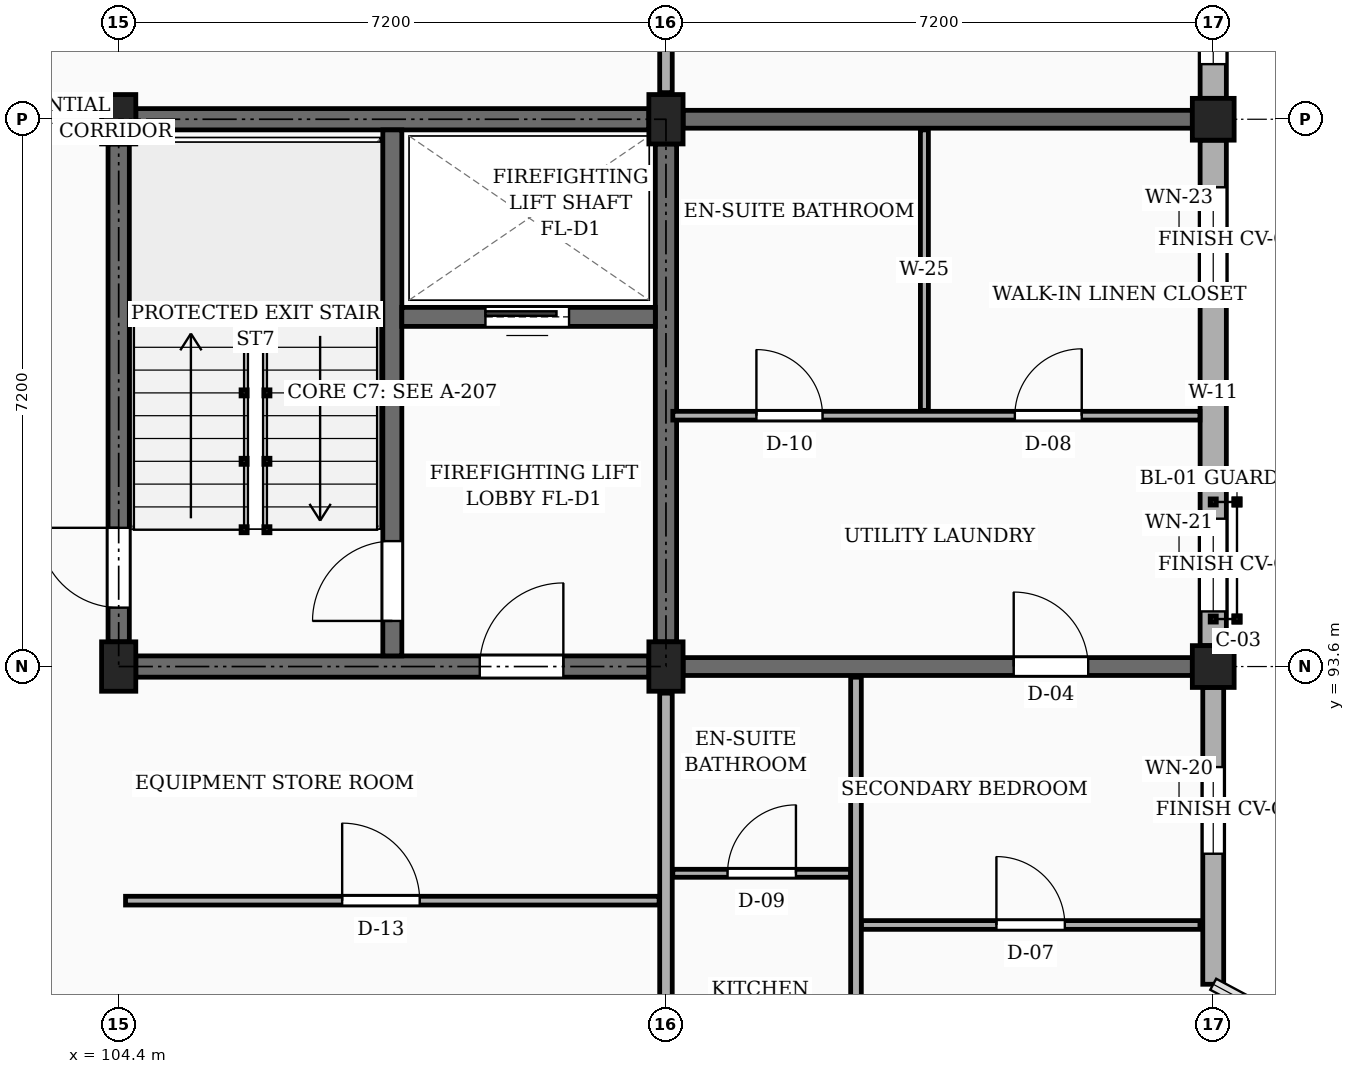
"""IFC4 building model, lengths in metres.
Left out: names, types, materials, properties, quantities, classifications, styles, units other than length and angle.
Written with IfcOpenShell. Run it as: python <this file> out.ifc"""

import sys

from ifc_helpers import new_model, si_unit, direction, frame, frame_2d, origin, origin_2d, place, context, subcontext, project, spatial, rectangle, extrude, element, fill, save


model = new_model("IFC4")
c1 = context("Model", 3, precision=1e-05, world=origin(), true_north=direction((0.0, 1.0)))
c2 = subcontext(c1, "Body", "Model", "MODEL_VIEW")
j1 = project(units=[si_unit("LENGTHUNIT", "METRE"), si_unit("PLANEANGLEUNIT", "RADIAN")], contexts=[c1])
p1 = place(None, origin())
s1 = spatial("IfcSite", under=j1, at=p1, CompositionType="ELEMENT")
p2 = place(p1, origin())
s2 = spatial("IfcBuilding", under=s1, at=p2, CompositionType="ELEMENT")
p3 = place(p2, frame((0.0, 0.0, 13.95)))
s3 = spatial("IfcBuildingStorey", under=s2, at=p3, CompositionType="ELEMENT", Elevation=13.95)
for number, where, z_axis, x_axis in (
    (1, (104.4, 93.6, 0.0), (0.0, 0.0, 1.0), (1.0, 0.0, 0.0)),
    (2, (104.4, 100.8, 0.0), (0.0, 0.0, 1.0), (1.0, 0.0, 0.0)),
    (3, (111.6, 93.6, 0.0), (0.0, 0.0, 1.0), (1.0, 0.0, 0.0)),
    (4, (111.6, 100.8, 0.0), (0.0, 0.0, 1.0), (1.0, 0.0, 0.0)),
):
    element("IfcColumn", number, at=place(p3, frame(where, z_axis=z_axis, x_axis=x_axis)), inside=s3, PredefinedType="COLUMN", context=c2, shape_type="SweptSolid", body=[
        extrude(rectangle(XDim=0.45, YDim=0.65, at=origin_2d()), origin(), (0.0, 0.0, 1.0), 3.15),
    ])
for number, where, z_axis, x_axis in (
    (5, (118.8, 93.6, 0.0), (0.0, 0.0, 1.0), (1.0, 0.0, 0.0)),
    (6, (118.8, 100.8, 0.0), (0.0, 0.0, 1.0), (1.0, 0.0, 0.0)),
):
    element("IfcColumn", number, at=place(p3, frame(where, z_axis=z_axis, x_axis=x_axis)), inside=s3, PredefinedType="COLUMN", context=c2, shape_type="SweptSolid", body=[
        extrude(rectangle(XDim=0.55, YDim=0.55, at=origin_2d()), origin(), (0.0, 0.0, 1.0), 3.15),
    ])
p4 = place(p3, frame((111.825, 93.6, 0.0), z_axis=(0.0, 0.0, 1.0), x_axis=(1.0, 0.0, 0.0)))
e7 = element("IfcWall", 7, at=p4, inside=s3, PredefinedType="SOLIDWALL", context=c2, shape_type="SweptSolid", body=[
    extrude(rectangle(XDim=6.7, YDim=0.235, at=frame_2d((3.35, 0.0))), origin(), (0.0, 0.0, 1.0), 2.19),
])
p5 = place(p4, frame((4.35, 0.0, 0.0)))
e8 = element("IfcOpeningElement", 8, at=p5, cuts=e7, PredefinedType="OPENING", context=c2, shape_type="SweptSolid", body=[
    extrude(rectangle(XDim=0.98, YDim=2.12, at=frame_2d((0.49, 1.06))), frame((0.0, 0.127, 0.0), z_axis=(0.0, -1.0, 0.0), x_axis=(1.0, 0.0, 0.0)), (0.0, 0.0, 1.0), 0.255),
])
p6 = place(p3, frame((111.825, 100.8, 0.0), z_axis=(0.0, 0.0, 1.0), x_axis=(1.0, 0.0, 0.0)))
e9 = element("IfcWall", 9, at=p6, inside=s3, PredefinedType="SOLIDWALL", context=c2, shape_type="SweptSolid", body=[
    extrude(rectangle(XDim=6.7, YDim=0.235, at=frame_2d((3.35, 0.0))), origin(), (0.0, 0.0, 1.0), 2.19),
])
p7 = place(p3, frame((118.8, 89.42, 0.0), z_axis=(0.0, 0.0, 1.0), x_axis=(0.0, 1.0, 0.0)))
e10 = element("IfcWall", 10, at=p7, inside=s3, PredefinedType="SOLIDWALL", context=c2, shape_type="SweptSolid", body=[
    extrude(rectangle(XDim=3.905, YDim=0.275, at=frame_2d((1.953, 0.0))), origin(), (0.0, 0.0, 1.0), 2.46),
])
p8 = place(p7, frame((1.718, 0.0, 0.78)))
e11 = element("IfcOpeningElement", 11, at=p8, cuts=e10, PredefinedType="OPENING", context=c2, shape_type="SweptSolid", body=[
    extrude(rectangle(XDim=1.14, YDim=1.36, at=frame_2d((0.57, 0.68))), frame((0.0, 0.147, 0.0), z_axis=(0.0, -1.0, 0.0), x_axis=(1.0, 0.0, 0.0)), (0.0, 0.0, 1.0), 0.295),
])
p9 = place(p3, frame((118.8, 93.875, 0.0), z_axis=(0.0, 0.0, 1.0), x_axis=(0.0, 1.0, 0.0)))
e12 = element("IfcWall", 12, at=p9, inside=s3, PredefinedType="SOLIDWALL", context=c2, shape_type="SweptSolid", body=[
    extrude(rectangle(XDim=6.65, YDim=0.345, at=frame_2d((3.325, 0.0))), origin(), (0.0, 0.0, 1.0), 2.46),
])
p10 = place(p9, frame((0.45, 0.0, 0.78)))
e13 = element("IfcOpeningElement", 13, at=p10, cuts=e12, PredefinedType="OPENING", context=c2, shape_type="SweptSolid", body=[
    extrude(rectangle(XDim=1.22, YDim=1.36, at=frame_2d((0.61, 0.68))), frame((0.0, 0.183, 0.0), z_axis=(0.0, -1.0, 0.0), x_axis=(1.0, 0.0, 0.0)), (0.0, 0.0, 1.0), 0.365),
])
p11 = place(p9, frame((4.65, 0.0, 0.78)))
e14 = element("IfcOpeningElement", 14, at=p11, cuts=e12, PredefinedType="OPENING", context=c2, shape_type="SweptSolid", body=[
    extrude(rectangle(XDim=1.38, YDim=1.36, at=frame_2d((0.69, 0.68))), frame((0.0, 0.183, 0.0), z_axis=(0.0, -1.0, 0.0), x_axis=(1.0, 0.0, 0.0)), (0.0, 0.0, 1.0), 0.365),
])
p12 = place(p3, frame((118.8, 101.075, 0.0), z_axis=(0.0, 0.0, 1.0), x_axis=(0.0, 1.0, 0.0)))
e15 = element("IfcWall", 15, at=p12, inside=s3, PredefinedType="SOLIDWALL", context=c2, shape_type="SweptSolid", body=[
    extrude(rectangle(XDim=6.65, YDim=0.345, at=frame_2d((3.325, 0.0))), origin(), (0.0, 0.0, 1.0), 2.46),
])
p13 = place(p12, frame((0.45, 0.0, 0.78)))
e16 = element("IfcOpeningElement", 16, at=p13, cuts=e15, PredefinedType="OPENING", context=c2, shape_type="SweptSolid", body=[
    extrude(rectangle(XDim=1.38, YDim=1.36, at=frame_2d((0.69, 0.68))), frame((0.0, 0.183, 0.0), z_axis=(0.0, -1.0, 0.0), x_axis=(1.0, 0.0, 0.0)), (0.0, 0.0, 1.0), 0.365),
])
p14 = place(p12, frame((4.65, 0.0, 0.78)))
e17 = element("IfcOpeningElement", 17, at=p14, cuts=e15, PredefinedType="OPENING", context=c2, shape_type="SweptSolid", body=[
    extrude(rectangle(XDim=0.94, YDim=1.44, at=frame_2d((0.47, 0.72))), frame((0.0, 0.183, 0.0), z_axis=(0.0, -1.0, 0.0), x_axis=(1.0, 0.0, 0.0)), (0.0, 0.0, 1.0), 0.365),
])
p15 = place(p3, frame((104.4, 93.925, 0.0), z_axis=(0.0, 0.0, 1.0), x_axis=(0.0, 1.0, 0.0)))
e18 = element("IfcWall", 18, at=p15, inside=s3, PredefinedType="SHEAR", context=c2, shape_type="SweptSolid", body=[
    extrude(rectangle(XDim=6.55, YDim=0.28, at=frame_2d((3.275, 0.0))), origin(), (0.0, 0.0, 1.0), 2.89),
])
p16 = place(p15, frame((0.45, 0.0, 0.0)))
e19 = element("IfcOpeningElement", 19, at=p16, cuts=e18, PredefinedType="OPENING", context=c2, shape_type="SweptSolid", body=[
    extrude(rectangle(XDim=1.05, YDim=2.15, at=frame_2d((0.525, 1.075))), frame((0.0, 0.15, 0.0), z_axis=(0.0, -1.0, 0.0), x_axis=(1.0, 0.0, 0.0)), (0.0, 0.0, 1.0), 0.3),
])
p17 = place(p3, frame((104.625, 100.8, 0.0), z_axis=(0.0, 0.0, 1.0), x_axis=(1.0, 0.0, 0.0)))
e20 = element("IfcWall", 20, at=p17, inside=s3, PredefinedType="SHEAR", context=c2, shape_type="SweptSolid", body=[
    extrude(rectangle(XDim=6.75, YDim=0.28, at=frame_2d((3.375, 0.0))), origin(), (0.0, 0.0, 1.0), 2.89),
])
p18 = place(p3, frame((111.6, 93.925, 0.0), z_axis=(0.0, 0.0, 1.0), x_axis=(0.0, 1.0, 0.0)))
e21 = element("IfcWall", 21, at=p18, inside=s3, PredefinedType="SHEAR", context=c2, shape_type="SweptSolid", body=[
    extrude(rectangle(XDim=6.55, YDim=0.28, at=frame_2d((3.275, 0.0))), origin(), (0.0, 0.0, 1.0), 2.89),
])
p19 = place(p3, frame((104.625, 93.6, 0.0), z_axis=(0.0, 0.0, 1.0), x_axis=(1.0, 0.0, 0.0)))
e22 = element("IfcWall", 22, at=p19, inside=s3, PredefinedType="SHEAR", context=c2, shape_type="SweptSolid", body=[
    extrude(rectangle(XDim=6.75, YDim=0.28, at=frame_2d((3.375, 0.0))), origin(), (0.0, 0.0, 1.0), 2.89),
])
p20 = place(p19, frame((4.525, 0.0, 0.0)))
e23 = element("IfcOpeningElement", 23, at=p20, cuts=e22, PredefinedType="OPENING", context=c2, shape_type="SweptSolid", body=[
    extrude(rectangle(XDim=1.1, YDim=2.15, at=frame_2d((0.55, 1.075))), frame((0.0, 0.15, 0.0), z_axis=(0.0, -1.0, 0.0), x_axis=(1.0, 0.0, 0.0)), (0.0, 0.0, 1.0), 0.3),
])
p21 = place(p3, frame((108.0, 93.74, 0.0), z_axis=(0.0, 0.0, 1.0), x_axis=(0.0, 1.0, 0.0)))
e24 = element("IfcWall", 24, at=p21, inside=s3, PredefinedType="SHEAR", context=c2, shape_type="SweptSolid", body=[
    extrude(rectangle(XDim=6.92, YDim=0.25, at=frame_2d((3.46, 0.0))), origin(), (0.0, 0.0, 1.0), 2.89),
])
p22 = place(p21, frame((0.46, 0.0, 0.0)))
e25 = element("IfcOpeningElement", 25, at=p22, cuts=e24, PredefinedType="OPENING", context=c2, shape_type="SweptSolid", body=[
    extrude(rectangle(XDim=1.05, YDim=2.15, at=frame_2d((0.525, 1.075))), frame((0.0, 0.135, 0.0), z_axis=(0.0, -1.0, 0.0), x_axis=(1.0, 0.0, 0.0)), (0.0, 0.0, 1.0), 0.27),
])
p23 = place(p3, frame((108.125, 98.2, 0.0), z_axis=(0.0, 0.0, 1.0), x_axis=(1.0, 0.0, 0.0)))
e26 = element("IfcWall", 26, at=p23, inside=s3, PredefinedType="SHEAR", context=c2, shape_type="SweptSolid", body=[
    extrude(rectangle(XDim=3.335, YDim=0.25, at=frame_2d((1.667, 0.0))), origin(), (0.0, 0.0, 1.0), 2.89),
])
p24 = place(p23, frame((1.1, 0.0, 0.0)))
e27 = element("IfcOpeningElement", 27, at=p24, cuts=e26, PredefinedType="OPENING", context=c2, shape_type="SweptSolid", body=[
    extrude(rectangle(XDim=1.1, YDim=2.2, at=frame_2d((0.55, 1.1))), frame((0.0, 0.135, 0.0), z_axis=(0.0, -1.0, 0.0), x_axis=(1.0, 0.0, 0.0)), (0.0, 0.0, 1.0), 0.27),
])
p25 = place(p3, frame((111.6, 86.75, 0.0), z_axis=(0.0, 0.0, 1.0), x_axis=(0.0, 1.0, 0.0)))
e28 = element("IfcWall", 28, at=p25, inside=s3, PredefinedType="PARTITIONING", context=c2, shape_type="SweptSolid", body=[
    extrude(rectangle(XDim=6.5, YDim=0.165, at=frame_2d((3.25, 0.0))), origin(), (0.0, 0.0, 1.0), 2.325),
])
p26 = place(p25, frame((1.0, 0.0, 0.0)))
e29 = element("IfcOpeningElement", 29, at=p26, cuts=e28, PredefinedType="OPENING", context=c2, shape_type="SweptSolid", body=[
    extrude(rectangle(XDim=1.14, YDim=2.18, at=frame_2d((0.57, 1.09))), frame((0.0, 0.093, 0.0), z_axis=(0.0, -1.0, 0.0), x_axis=(1.0, 0.0, 0.0)), (0.0, 0.0, 1.0), 0.185),
])
p27 = place(p3, frame((111.6, 101.15, 0.0), z_axis=(0.0, 0.0, 1.0), x_axis=(0.0, 1.0, 0.0)))
e30 = element("IfcWall", 30, at=p27, inside=s3, PredefinedType="PARTITIONING", context=c2, shape_type="SweptSolid", body=[
    extrude(rectangle(XDim=6.5, YDim=0.165, at=frame_2d((3.25, 0.0))), origin(), (0.0, 0.0, 1.0), 2.325),
])
p28 = place(p27, frame((1.1, 0.0, 0.0)))
e31 = element("IfcOpeningElement", 31, at=p28, cuts=e30, PredefinedType="OPENING", context=c2, shape_type="SweptSolid", body=[
    extrude(rectangle(XDim=1.0, YDim=2.15, at=frame_2d((0.5, 1.075))), frame((0.0, 0.093, 0.0), z_axis=(0.0, -1.0, 0.0), x_axis=(1.0, 0.0, 0.0)), (0.0, 0.0, 1.0), 0.185),
])
p29 = place(p3, frame((104.49, 90.52, 0.0), z_axis=(0.0, 0.0, 1.0), x_axis=(1.0, 0.0, 0.0)))
e32 = element("IfcWall", 32, at=p29, inside=s3, PredefinedType="PARTITIONING", context=c2, shape_type="SweptSolid", body=[
    extrude(rectangle(XDim=7.02, YDim=0.115, at=frame_2d((3.51, 0.0))), origin(), (0.0, 0.0, 1.0), 2.325),
])
p30 = place(p29, frame((2.85, 0.0, 0.0)))
e33 = element("IfcOpeningElement", 33, at=p30, cuts=e32, PredefinedType="OPENING", context=c2, shape_type="SweptSolid", body=[
    extrude(rectangle(XDim=1.02, YDim=2.15, at=frame_2d((0.51, 1.075))), frame((0.0, 0.067, 0.0), z_axis=(0.0, -1.0, 0.0), x_axis=(1.0, 0.0, 0.0)), (0.0, 0.0, 1.0), 0.135),
])
p31 = place(p3, frame((114.17, 90.2, 0.0), z_axis=(0.0, 0.0, 1.0), x_axis=(1.0, 0.0, 0.0)))
e34 = element("IfcWall", 34, at=p31, inside=s3, PredefinedType="PARTITIONING", context=c2, shape_type="SweptSolid", body=[
    extrude(rectangle(XDim=4.455, YDim=0.115, at=frame_2d((2.228, 0.0))), origin(), (0.0, 0.0, 1.0), 2.325),
])
p32 = place(p31, frame((1.778, 0.0, 0.0)))
e35 = element("IfcOpeningElement", 35, at=p32, cuts=e34, PredefinedType="OPENING", context=c2, shape_type="SweptSolid", body=[
    extrude(rectangle(XDim=0.9, YDim=2.1, at=frame_2d((0.45, 1.05))), frame((0.0, 0.067, 0.0), z_axis=(0.0, -1.0, 0.0), x_axis=(1.0, 0.0, 0.0)), (0.0, 0.0, 1.0), 0.135),
])
p33 = place(p3, frame((111.69, 90.88, 0.0), z_axis=(0.0, 0.0, 1.0), x_axis=(1.0, 0.0, 0.0)))
e36 = element("IfcWall", 36, at=p33, inside=s3, PredefinedType="PARTITIONING", context=c2, shape_type="SweptSolid", body=[
    extrude(rectangle(XDim=2.34, YDim=0.105, at=frame_2d((1.17, 0.0))), origin(), (0.0, 0.0, 1.0), 2.325),
])
p34 = place(p33, frame((0.72, 0.0, 0.0)))
e37 = element("IfcOpeningElement", 37, at=p34, cuts=e36, PredefinedType="OPENING", context=c2, shape_type="SweptSolid", body=[
    extrude(rectangle(XDim=0.9, YDim=2.05, at=frame_2d((0.45, 1.025))), frame((0.0, 0.062, 0.0), z_axis=(0.0, -1.0, 0.0), x_axis=(1.0, 0.0, 0.0)), (0.0, 0.0, 1.0), 0.125),
])
p35 = place(p3, frame((114.1, 86.575, 0.0), z_axis=(0.0, 0.0, 1.0), x_axis=(0.0, 1.0, 0.0)))
e38 = element("IfcWall", 38, at=p35, inside=s3, PredefinedType="PARTITIONING", context=c2, shape_type="SweptSolid", body=[
    extrude(rectangle(XDim=6.885, YDim=0.14, at=frame_2d((3.442, 0.0))), origin(), (0.0, 0.0, 1.0), 2.325),
])
p36 = place(p35, frame((1.275, 0.0, 0.0)))
e39 = element("IfcOpeningElement", 39, at=p36, cuts=e38, PredefinedType="OPENING", context=c2, shape_type="SweptSolid", body=[
    extrude(rectangle(XDim=0.95, YDim=2.1, at=frame_2d((0.475, 1.05))), frame((0.0, 0.08, 0.0), z_axis=(0.0, -1.0, 0.0), x_axis=(1.0, 0.0, 0.0)), (0.0, 0.0, 1.0), 0.16),
])
p37 = place(p3, frame((111.69, 96.9, 0.0), z_axis=(0.0, 0.0, 1.0), x_axis=(1.0, 0.0, 0.0)))
e40 = element("IfcWall", 40, at=p37, inside=s3, PredefinedType="PARTITIONING", context=c2, shape_type="SweptSolid", body=[
    extrude(rectangle(XDim=6.935, YDim=0.115, at=frame_2d((3.468, 0.0))), origin(), (0.0, 0.0, 1.0), 2.325),
])
p38 = place(p37, frame((1.1, 0.0, 0.0)))
e41 = element("IfcOpeningElement", 41, at=p38, cuts=e40, PredefinedType="OPENING", context=c2, shape_type="SweptSolid", body=[
    extrude(rectangle(XDim=0.87, YDim=2.05, at=frame_2d((0.435, 1.025))), frame((0.0, 0.067, 0.0), z_axis=(0.0, -1.0, 0.0), x_axis=(1.0, 0.0, 0.0)), (0.0, 0.0, 1.0), 0.135),
])
p39 = place(p37, frame((4.5, 0.0, 0.0)))
e42 = element("IfcOpeningElement", 42, at=p39, cuts=e40, PredefinedType="OPENING", context=c2, shape_type="SweptSolid", body=[
    extrude(rectangle(XDim=0.88, YDim=2.08, at=frame_2d((0.44, 1.04))), frame((0.0, 0.067, 0.0), z_axis=(0.0, -1.0, 0.0), x_axis=(1.0, 0.0, 0.0)), (0.0, 0.0, 1.0), 0.135),
])
p40 = place(p3, frame((115.0, 96.97, 0.0), z_axis=(0.0, 0.0, 1.0), x_axis=(0.0, 1.0, 0.0)))
e43 = element("IfcWall", 43, at=p40, inside=s3, PredefinedType="PARTITIONING", context=c2, shape_type="SweptSolid", body=[
    extrude(rectangle(XDim=3.69, YDim=0.105, at=frame_2d((1.845, 0.0))), origin(), (0.0, 0.0, 1.0), 2.325),
])
p41 = place(p8, origin())
e44 = element("IfcWindow", 44, at=p41, inside=s3, PartitioningType="SINGLE_PANEL", PredefinedType="WINDOW", context=c2, shape_type="SweptSolid", body=[
    extrude(rectangle(XDim=1.14, YDim=1.36, at=frame_2d((0.57, 0.68))), frame((0.0, 0.03, 0.0), z_axis=(0.0, -1.0, 0.0), x_axis=(1.0, 0.0, 0.0)), (0.0, 0.0, 1.0), 0.06),
])
fill(e11, e44)
p42 = place(p10, origin())
e45 = element("IfcWindow", 45, at=p42, inside=s3, PartitioningType="SINGLE_PANEL", PredefinedType="WINDOW", context=c2, shape_type="SweptSolid", body=[
    extrude(rectangle(XDim=1.22, YDim=1.36, at=frame_2d((0.61, 0.68))), frame((0.0, 0.03, 0.0), z_axis=(0.0, -1.0, 0.0), x_axis=(1.0, 0.0, 0.0)), (0.0, 0.0, 1.0), 0.06),
])
fill(e13, e45)
p43 = place(p11, origin())
e46 = element("IfcWindow", 46, at=p43, inside=s3, PartitioningType="SINGLE_PANEL", PredefinedType="WINDOW", context=c2, shape_type="SweptSolid", body=[
    extrude(rectangle(XDim=1.38, YDim=1.36, at=frame_2d((0.69, 0.68))), frame((0.0, 0.03, 0.0), z_axis=(0.0, -1.0, 0.0), x_axis=(1.0, 0.0, 0.0)), (0.0, 0.0, 1.0), 0.06),
])
fill(e14, e46)
p44 = place(p13, origin())
e47 = element("IfcWindow", 47, at=p44, inside=s3, PartitioningType="SINGLE_PANEL", PredefinedType="WINDOW", context=c2, shape_type="SweptSolid", body=[
    extrude(rectangle(XDim=1.38, YDim=1.36, at=frame_2d((0.69, 0.68))), frame((0.0, 0.03, 0.0), z_axis=(0.0, -1.0, 0.0), x_axis=(1.0, 0.0, 0.0)), (0.0, 0.0, 1.0), 0.06),
])
fill(e16, e47)
p45 = place(p16, origin())
e48 = element("IfcDoor", 48, at=p45, inside=s3, OperationType="SINGLE_SWING_RIGHT", PredefinedType="DOOR", context=c2, shape_type="SweptSolid", body=[
    extrude(rectangle(XDim=1.05, YDim=2.15, at=frame_2d((0.525, 1.075))), frame((0.0, 0.025, 0.0), z_axis=(0.0, -1.0, 0.0), x_axis=(1.0, 0.0, 0.0)), (0.0, 0.0, 1.0), 0.05),
])
fill(e19, e48)
p46 = place(p20, frame((1.1, 0.0, 0.0), z_axis=(0.0, 0.0, 1.0), x_axis=(-1.0, 0.0, 0.0)))
e49 = element("IfcDoor", 49, at=p46, inside=s3, OperationType="SINGLE_SWING_RIGHT", PredefinedType="DOOR", context=c2, shape_type="SweptSolid", body=[
    extrude(rectangle(XDim=1.1, YDim=2.15, at=frame_2d((0.55, 1.075))), frame((0.0, 0.025, 0.0), z_axis=(0.0, -1.0, 0.0), x_axis=(1.0, 0.0, 0.0)), (0.0, 0.0, 1.0), 0.05),
])
fill(e23, e49)
p47 = place(p22, origin())
e50 = element("IfcDoor", 50, at=p47, inside=s3, OperationType="SINGLE_SWING_LEFT", PredefinedType="DOOR", context=c2, shape_type="SweptSolid", body=[
    extrude(rectangle(XDim=1.05, YDim=2.15, at=frame_2d((0.525, 1.075))), frame((0.0, 0.025, 0.0), z_axis=(0.0, -1.0, 0.0), x_axis=(1.0, 0.0, 0.0)), (0.0, 0.0, 1.0), 0.05),
])
fill(e25, e50)
p48 = place(p24, origin())
e51 = element("IfcDoor", 51, at=p48, inside=s3, OperationType="SLIDING_TO_LEFT", PredefinedType="DOOR", context=c2, shape_type="SweptSolid", body=[
    extrude(rectangle(XDim=1.1, YDim=2.2, at=frame_2d((0.55, 1.1))), frame((0.0, 0.025, 0.0), z_axis=(0.0, -1.0, 0.0), x_axis=(1.0, 0.0, 0.0)), (0.0, 0.0, 1.0), 0.05),
])
fill(e27, e51)
p49 = place(p30, origin())
e52 = element("IfcDoor", 52, at=p49, inside=s3, OperationType="SINGLE_SWING_LEFT", PredefinedType="DOOR", context=c2, shape_type="SweptSolid", body=[
    extrude(rectangle(XDim=1.02, YDim=2.15, at=frame_2d((0.51, 1.075))), frame((0.0, 0.025, 0.0), z_axis=(0.0, -1.0, 0.0), x_axis=(1.0, 0.0, 0.0)), (0.0, 0.0, 1.0), 0.05),
])
fill(e33, e52)
p50 = place(p32, origin())
e53 = element("IfcDoor", 53, at=p50, inside=s3, OperationType="SINGLE_SWING_LEFT", PredefinedType="DOOR", context=c2, shape_type="SweptSolid", body=[
    extrude(rectangle(XDim=0.9, YDim=2.1, at=frame_2d((0.45, 1.05))), frame((0.0, 0.025, 0.0), z_axis=(0.0, -1.0, 0.0), x_axis=(1.0, 0.0, 0.0)), (0.0, 0.0, 1.0), 0.05),
])
fill(e35, e53)
p51 = place(p34, origin())
e54 = element("IfcDoor", 54, at=p51, inside=s3, OperationType="SINGLE_SWING_RIGHT", PredefinedType="DOOR", context=c2, shape_type="SweptSolid", body=[
    extrude(rectangle(XDim=0.9, YDim=2.05, at=frame_2d((0.45, 1.025))), frame((0.0, 0.025, 0.0), z_axis=(0.0, -1.0, 0.0), x_axis=(1.0, 0.0, 0.0)), (0.0, 0.0, 1.0), 0.05),
])
fill(e37, e54)
p52 = place(p38, origin())
e55 = element("IfcDoor", 55, at=p52, inside=s3, OperationType="SINGLE_SWING_LEFT", PredefinedType="DOOR", context=c2, shape_type="SweptSolid", body=[
    extrude(rectangle(XDim=0.87, YDim=2.05, at=frame_2d((0.435, 1.025))), frame((0.0, 0.025, 0.0), z_axis=(0.0, -1.0, 0.0), x_axis=(1.0, 0.0, 0.0)), (0.0, 0.0, 1.0), 0.05),
])
fill(e41, e55)
p53 = place(p39, origin())
e56 = element("IfcDoor", 56, at=p53, inside=s3, OperationType="SINGLE_SWING_RIGHT", PredefinedType="DOOR", context=c2, shape_type="SweptSolid", body=[
    extrude(rectangle(XDim=0.88, YDim=2.08, at=frame_2d((0.44, 1.04))), frame((0.0, 0.025, 0.0), z_axis=(0.0, -1.0, 0.0), x_axis=(1.0, 0.0, 0.0)), (0.0, 0.0, 1.0), 0.05),
])
fill(e42, e56)
p54 = place(p5, origin())
e57 = element("IfcDoor", 57, at=p54, inside=s3, OperationType="SINGLE_SWING_LEFT", PredefinedType="DOOR", context=c2, shape_type="SweptSolid", body=[
    extrude(rectangle(XDim=0.98, YDim=2.12, at=frame_2d((0.49, 1.06))), frame((0.0, 0.025, 0.0), z_axis=(0.0, -1.0, 0.0), x_axis=(1.0, 0.0, 0.0)), (0.0, 0.0, 1.0), 0.05),
])
fill(e8, e57)
save(model, sys.argv[1])
